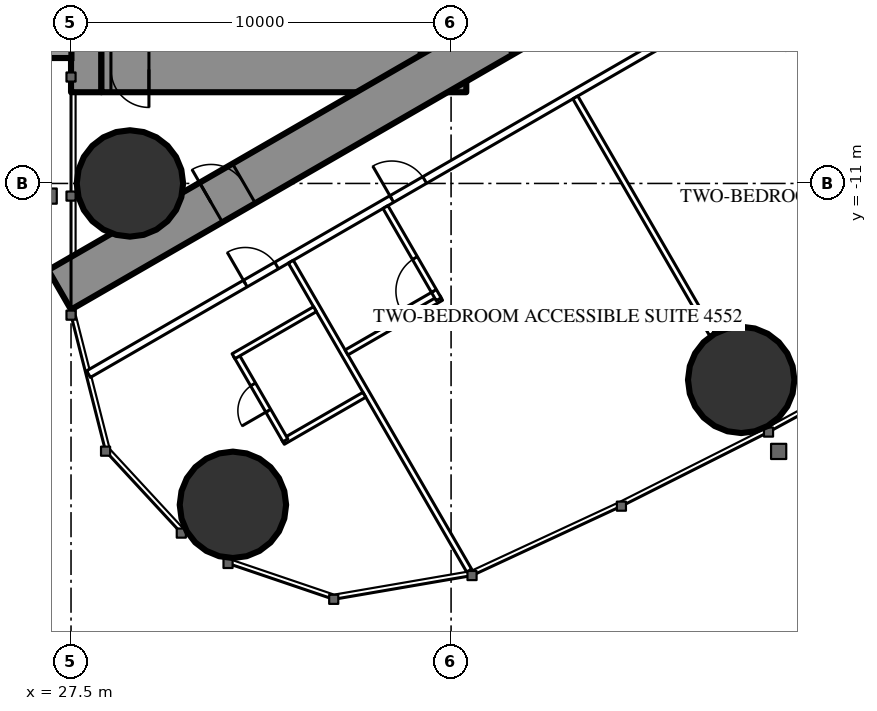
"""IFC4 building model, lengths in metres.
Left out: names, types, materials, properties, quantities, classifications, styles, units other than length and angle.
Written with IfcOpenShell. Run it as: python <this file> out.ifc"""

import sys

from ifc_helpers import new_model, si_unit, direction, frame, frame_2d, origin, origin_2d, place, context, subcontext, project, spatial, rectangle, circle, extrude, element, fill, save


model = new_model("IFC4")
c1 = context("Model", 3, precision=1e-05, world=origin(), true_north=direction((0.0, 1.0)))
c2 = subcontext(c1, "Body", "Model", "MODEL_VIEW")
j1 = project(units=[si_unit("LENGTHUNIT", "METRE"), si_unit("PLANEANGLEUNIT", "RADIAN")], contexts=[c1])
p1 = place(None, origin())
s1 = spatial("IfcSite", under=j1, at=p1, CompositionType="ELEMENT")
p2 = place(p1, origin())
s2 = spatial("IfcBuilding", under=s1, at=p2, CompositionType="ELEMENT")
p3 = place(p2, frame((0.0, 0.0, 170.3)))
s3 = spatial("IfcBuildingStorey", under=s2, at=p3, CompositionType="ELEMENT", Elevation=170.3)
for number, where, z_axis, x_axis in (
    (1, (31.76, -19.456, 0.0), (0.0, 0.0, 1.0), (1.0, 0.0, 0.0)),
    (2, (29.05, -11.0, 0.0), (0.0, 0.0, 1.0), (1.0, 0.0, 0.0)),
    (3, (45.134, -16.168, 0.0), (0.0, 0.0, 1.0), (1.0, 0.0, 0.0)),
):
    element("IfcColumn", number, at=place(p3, frame(where, z_axis=z_axis, x_axis=x_axis)), inside=s3, PredefinedType="COLUMN", context=c2, shape_type="SweptSolid", body=[
        extrude(circle(Radius=1.4, at=origin_2d()), origin(), (0.0, 0.0, 1.0), 3.5),
    ])
p4 = place(p3, frame((27.9, -8.6, 0.0), z_axis=(0.0, 0.0, 1.0), x_axis=(0.0, 1.0, 0.0)))
e4 = element("IfcWall", 4, at=p4, inside=s3, PredefinedType="SHEAR", context=c2, shape_type="SweptSolid", body=[
    extrude(rectangle(XDim=17.2, YDim=0.8, at=frame_2d((8.6, 0.0))), origin(), (0.0, 0.0, 1.0), 3.5),
])
p5 = place(p4, frame((2.45, 0.0, 0.6)))
e5 = element("IfcOpeningElement", 5, at=p5, cuts=e4, PredefinedType="OPENING", context=c2, shape_type="SweptSolid", body=[
    extrude(rectangle(XDim=0.6, YDim=2.1, at=frame_2d((0.3, 1.05))), frame((0.0, 0.41, 0.0), z_axis=(0.0, -1.0, 0.0), x_axis=(1.0, 0.0, 0.0)), (0.0, 0.0, 1.0), 0.82),
])
p6 = place(p4, frame((14.15, 0.0, 0.6)))
e6 = element("IfcOpeningElement", 6, at=p6, cuts=e4, PredefinedType="OPENING", context=c2, shape_type="SweptSolid", body=[
    extrude(rectangle(XDim=0.6, YDim=2.1, at=frame_2d((0.3, 1.05))), frame((0.0, 0.41, 0.0), z_axis=(0.0, -1.0, 0.0), x_axis=(1.0, 0.0, 0.0)), (0.0, 0.0, 1.0), 0.82),
])
p7 = place(p3, frame((37.3, -8.6, 0.0), z_axis=(0.0, 0.0, 1.0), x_axis=(0.0, 1.0, 0.0)))
e7 = element("IfcWall", 7, at=p7, inside=s3, PredefinedType="SHEAR", context=c2, shape_type="SweptSolid", body=[
    extrude(rectangle(XDim=17.2, YDim=1.2, at=frame_2d((8.6, 0.0))), origin(), (0.0, 0.0, 1.0), 3.5),
])
p8 = place(p7, frame((7.7, 0.0, 0.0)))
e8 = element("IfcOpeningElement", 8, at=p8, cuts=e7, PredefinedType="OPENING", context=c2, shape_type="SweptSolid", body=[
    extrude(rectangle(XDim=1.8, YDim=2.2, at=frame_2d((0.9, 1.1))), frame((0.0, 0.61, 0.0), z_axis=(0.0, -1.0, 0.0), x_axis=(1.0, 0.0, 0.0)), (0.0, 0.0, 1.0), 1.22),
])
p9 = place(p3, frame((28.3, -8.0, 0.0), z_axis=(0.0, 0.0, 1.0), x_axis=(1.0, 0.0, 0.0)))
e9 = element("IfcWall", 9, at=p9, inside=s3, PredefinedType="SHEAR", context=c2, shape_type="SweptSolid", body=[
    extrude(rectangle(XDim=8.4, YDim=1.2, at=frame_2d((4.2, 0.0))), origin(), (0.0, 0.0, 1.0), 3.5),
])
p10 = place(p9, frame((0.25, 0.0, 0.0)))
e10 = element("IfcOpeningElement", 10, at=p10, cuts=e9, PredefinedType="OPENING", context=c2, shape_type="SweptSolid", body=[
    extrude(rectangle(XDim=1.0, YDim=2.2, at=frame_2d((0.5, 1.1))), frame((0.0, 0.61, 0.0), z_axis=(0.0, -1.0, 0.0), x_axis=(1.0, 0.0, 0.0)), (0.0, 0.0, 1.0), 1.22),
])
p11 = place(p3, frame((27.2, -13.8, 0.0), z_axis=(0.0, 0.0, 1.0), x_axis=(0.866027159892, 0.499996958321, 0.0)))
e11 = element("IfcWall", 11, at=p11, inside=s3, PredefinedType="SHEAR", context=c2, shape_type="SweptSolid", body=[
    extrude(rectangle(XDim=27.947, YDim=1.2, at=frame_2d((13.973, 0.0))), origin(), (0.0, 0.0, 1.0), 3.5),
])
p12 = place(p11, frame((4.6, 0.0, 0.0)))
e12 = element("IfcOpeningElement", 12, at=p12, cuts=e11, PredefinedType="OPENING", context=c2, shape_type="SweptSolid", body=[
    extrude(rectangle(XDim=1.0, YDim=2.2, at=frame_2d((0.5, 1.1))), frame((0.0, 0.61, 0.0), z_axis=(0.0, -1.0, 0.0), x_axis=(1.0, 0.0, 0.0)), (0.0, 0.0, 1.0), 1.22),
])
p13 = place(p11, frame((13.395, 0.0, 0.0)))
e13 = element("IfcOpeningElement", 13, at=p13, cuts=e11, PredefinedType="OPENING", context=c2, shape_type="SweptSolid", body=[
    extrude(rectangle(XDim=1.8, YDim=2.2, at=frame_2d((0.9, 1.1))), frame((0.0, 0.61, 0.0), z_axis=(0.0, -1.0, 0.0), x_axis=(1.0, 0.0, 0.0)), (0.0, 0.0, 1.0), 1.22),
])
p14 = place(p3, frame((27.959, -16.017, 0.0), z_axis=(0.0, 0.0, 1.0), x_axis=(0.866024151371, 0.500002169237, 0.0)))
e14 = element("IfcWall", 14, at=p14, inside=s3, PredefinedType="PARTITIONING", context=c2, shape_type="SweptSolid", body=[
    extrude(rectangle(XDim=32.034, YDim=0.2, at=frame_2d((16.017, 0.0))), origin(), (0.0, 0.0, 1.0), 3.25),
])
p15 = place(p14, frame((4.765, 0.0, 0.0)))
e15 = element("IfcOpeningElement", 15, at=p15, cuts=e14, PredefinedType="OPENING", context=c2, shape_type="SweptSolid", body=[
    extrude(rectangle(XDim=0.95, YDim=2.2, at=frame_2d((0.475, 1.1))), frame((0.0, 0.11, 0.0), z_axis=(0.0, -1.0, 0.0), x_axis=(1.0, 0.0, 0.0)), (0.0, 0.0, 1.0), 0.22),
])
p16 = place(p14, frame((9.215, 0.0, 0.0)))
e16 = element("IfcOpeningElement", 16, at=p16, cuts=e14, PredefinedType="OPENING", context=c2, shape_type="SweptSolid", body=[
    extrude(rectangle(XDim=1.0, YDim=2.2, at=frame_2d((0.5, 1.1))), frame((0.0, 0.11, 0.0), z_axis=(0.0, -1.0, 0.0), x_axis=(1.0, 0.0, 0.0)), (0.0, 0.0, 1.0), 0.22),
])
p17 = place(p14, frame((19.725, 0.0, 0.0)))
e17 = element("IfcOpeningElement", 17, at=p17, cuts=e14, PredefinedType="OPENING", context=c2, shape_type="SweptSolid", body=[
    extrude(rectangle(XDim=0.95, YDim=2.2, at=frame_2d((0.475, 1.1))), frame((0.0, 0.11, 0.0), z_axis=(0.0, -1.0, 0.0), x_axis=(1.0, 0.0, 0.0)), (0.0, 0.0, 1.0), 0.22),
])
p18 = place(p14, frame((26.125, 0.0, 0.0)))
e18 = element("IfcOpeningElement", 18, at=p18, cuts=e14, PredefinedType="OPENING", context=c2, shape_type="SweptSolid", body=[
    extrude(rectangle(XDim=0.95, YDim=2.2, at=frame_2d((0.475, 1.1))), frame((0.0, 0.11, 0.0), z_axis=(0.0, -1.0, 0.0), x_axis=(1.0, 0.0, 0.0)), (0.0, 0.0, 1.0), 0.22),
])
p19 = place(p14, frame((28.106, 0.0, 0.0)))
e19 = element("IfcOpeningElement", 19, at=p19, cuts=e14, PredefinedType="OPENING", context=c2, shape_type="SweptSolid", body=[
    extrude(rectangle(XDim=0.95, YDim=2.2, at=frame_2d((0.475, 1.1))), frame((0.0, 0.11, 0.0), z_axis=(0.0, -1.0, 0.0), x_axis=(1.0, 0.0, 0.0)), (0.0, 0.0, 1.0), 0.22),
])
p20 = place(p3, frame((33.284, -13.059, 0.0), z_axis=(0.0, 0.0, 1.0), x_axis=(0.499985904184, -0.866033541855, 0.0)))
e20 = element("IfcWall", 20, at=p20, inside=s3, PredefinedType="PARTITIONING", context=c2, shape_type="SweptSolid", body=[
    extrude(rectangle(XDim=9.385, YDim=0.15, at=frame_2d((4.693, 0.0))), origin(), (0.0, 0.0, 1.0), 3.25),
])
p21 = place(p3, frame((40.769, -8.737, 0.0), z_axis=(0.0, 0.0, 1.0), x_axis=(0.500013115284, -0.866017831539, 0.0)))
e21 = element("IfcWall", 21, at=p21, inside=s3, PredefinedType="PARTITIONING", context=c2, shape_type="SweptSolid", body=[
    extrude(rectangle(XDim=7.198, YDim=0.15, at=frame_2d((3.599, 0.0))), origin(), (0.0, 0.0, 1.0), 2.3),
])
p22 = place(p3, frame((33.075, -17.798, 0.0), z_axis=(0.0, 0.0, 1.0), x_axis=(0.866006523861, 0.500032699561, 0.0)))
e22 = element("IfcWall", 22, at=p22, inside=s3, PredefinedType="PARTITIONING", context=c2, shape_type="SweptSolid", body=[
    extrude(rectangle(XDim=2.475, YDim=0.15, at=frame_2d((1.237, 0.0))), origin(), (0.0, 0.0, 1.0), 3.25),
])
p23 = place(p3, frame((31.84, -15.509, 0.0), z_axis=(0.0, 0.0, 1.0), x_axis=(0.500006934395, -0.866021400173, 0.0)))
e23 = element("IfcWall", 23, at=p23, inside=s3, PredefinedType="PARTITIONING", context=c2, shape_type="SweptSolid", body=[
    extrude(rectangle(XDim=2.6, YDim=0.15, at=frame_2d((1.3, 0.0))), origin(), (0.0, 0.0, 1.0), 3.25),
])
p24 = place(p23, frame((0.9, 0.0, 0.0)))
e24 = element("IfcOpeningElement", 24, at=p24, cuts=e23, PredefinedType="OPENING", context=c2, shape_type="SweptSolid", body=[
    extrude(rectangle(XDim=0.8, YDim=2.2, at=frame_2d((0.4, 1.1))), frame((0.0, 0.085, 0.0), z_axis=(0.0, -1.0, 0.0), x_axis=(1.0, 0.0, 0.0)), (0.0, 0.0, 1.0), 0.17),
])
p25 = place(p3, frame((31.775, -15.546, 0.0), z_axis=(0.0, 0.0, 1.0), x_axis=(0.866031185235, 0.4999899861, 0.0)))
e25 = element("IfcWall", 25, at=p25, inside=s3, PredefinedType="PARTITIONING", context=c2, shape_type="SweptSolid", body=[
    extrude(rectangle(XDim=2.475, YDim=0.15, at=frame_2d((1.238, 0.0))), origin(), (0.0, 0.0, 1.0), 3.25),
])
p26 = place(p3, frame((34.749, -15.446, 0.0), z_axis=(0.0, 0.0, 1.0), x_axis=(0.866018712932, 0.500011588718, 0.0)))
e26 = element("IfcWall", 26, at=p26, inside=s3, PredefinedType="PARTITIONING", context=c2, shape_type="SweptSolid", body=[
    extrude(rectangle(XDim=2.875, YDim=0.15, at=frame_2d((1.438, 0.0))), origin(), (0.0, 0.0, 1.0), 3.25),
])
p27 = place(p3, frame((35.773, -11.621, 0.0), z_axis=(0.0, 0.0, 1.0), x_axis=(0.49998411664, -0.866034573852, 0.0)))
e27 = element("IfcWall", 27, at=p27, inside=s3, PredefinedType="PARTITIONING", context=c2, shape_type="SweptSolid", body=[
    extrude(rectangle(XDim=2.8, YDim=0.15, at=frame_2d((1.4, 0.0))), origin(), (0.0, 0.0, 1.0), 3.25),
])
p28 = place(p27, frame((1.55, 0.0, 0.0)))
e28 = element("IfcOpeningElement", 28, at=p28, cuts=e27, PredefinedType="OPENING", context=c2, shape_type="SweptSolid", body=[
    extrude(rectangle(XDim=1.0, YDim=2.2, at=frame_2d((0.5, 1.1))), frame((0.0, 0.085, 0.0), z_axis=(0.0, -1.0, 0.0), x_axis=(1.0, 0.0, 0.0)), (0.0, 0.0, 1.0), 0.17),
])
p29 = place(p3, frame((46.131, -5.641, 0.0), z_axis=(0.0, 0.0, 1.0), x_axis=(0.49997716683, -0.86603858612, 0.0)))
e29 = element("IfcWall", 29, at=p29, inside=s3, PredefinedType="PARTITIONING", context=c2, shape_type="SweptSolid", body=[
    extrude(rectangle(XDim=2.6, YDim=0.15, at=frame_2d((1.3, 0.0))), origin(), (0.0, 0.0, 1.0), 3.25),
])
p30 = place(p29, frame((0.9, 0.0, 0.0)))
e30 = element("IfcOpeningElement", 30, at=p30, cuts=e29, PredefinedType="OPENING", context=c2, shape_type="SweptSolid", body=[
    extrude(rectangle(XDim=0.8, YDim=2.2, at=frame_2d((0.4, 1.1))), frame((0.0, 0.085, 0.0), z_axis=(0.0, -1.0, 0.0), x_axis=(1.0, 0.0, 0.0)), (0.0, 0.0, 1.0), 0.17),
])
p31 = place(p24, origin())
e31 = element("IfcDoor", 31, at=p31, inside=s3, OperationType="SINGLE_SWING_RIGHT", PredefinedType="DOOR", context=c2, shape_type="SweptSolid", body=[
    extrude(rectangle(XDim=0.8, YDim=2.2, at=frame_2d((0.4, 1.1))), frame((0.0, 0.025, 0.0), z_axis=(0.0, -1.0, 0.0), x_axis=(1.0, 0.0, 0.0)), (0.0, 0.0, 1.0), 0.05),
])
fill(e24, e31)
p32 = place(p15, origin())
e32 = element("IfcDoor", 32, at=p32, inside=s3, OperationType="SINGLE_SWING_LEFT", PredefinedType="DOOR", context=c2, shape_type="SweptSolid", body=[
    extrude(rectangle(XDim=0.95, YDim=2.2, at=frame_2d((0.475, 1.1))), frame((0.0, 0.025, 0.0), z_axis=(0.0, -1.0, 0.0), x_axis=(1.0, 0.0, 0.0)), (0.0, 0.0, 1.0), 0.05),
])
fill(e15, e32)
p33 = place(p28, origin())
e33 = element("IfcDoor", 33, at=p33, inside=s3, OperationType="SINGLE_SWING_RIGHT", PredefinedType="DOOR", context=c2, shape_type="SweptSolid", body=[
    extrude(rectangle(XDim=1.0, YDim=2.2, at=frame_2d((0.5, 1.1))), frame((0.0, 0.025, 0.0), z_axis=(0.0, -1.0, 0.0), x_axis=(1.0, 0.0, 0.0)), (0.0, 0.0, 1.0), 0.05),
])
fill(e28, e33)
p34 = place(p16, origin())
e34 = element("IfcDoor", 34, at=p34, inside=s3, OperationType="SINGLE_SWING_LEFT", PredefinedType="DOOR", context=c2, shape_type="SweptSolid", body=[
    extrude(rectangle(XDim=1.0, YDim=2.2, at=frame_2d((0.5, 1.1))), frame((0.0, 0.025, 0.0), z_axis=(0.0, -1.0, 0.0), x_axis=(1.0, 0.0, 0.0)), (0.0, 0.0, 1.0), 0.05),
])
fill(e16, e34)
p35 = place(p12, origin())
e35 = element("IfcDoor", 35, at=p35, inside=s3, OperationType="SINGLE_SWING_LEFT", PredefinedType="DOOR", context=c2, shape_type="SweptSolid", body=[
    extrude(rectangle(XDim=1.0, YDim=2.2, at=frame_2d((0.5, 1.1))), frame((0.0, 0.025, 0.0), z_axis=(0.0, -1.0, 0.0), x_axis=(1.0, 0.0, 0.0)), (0.0, 0.0, 1.0), 0.05),
])
fill(e12, e35)
p36 = place(p10, origin())
e36 = element("IfcDoor", 36, at=p36, inside=s3, OperationType="SINGLE_SWING_RIGHT", PredefinedType="DOOR", context=c2, shape_type="SweptSolid", body=[
    extrude(rectangle(XDim=1.0, YDim=2.2, at=frame_2d((0.5, 1.1))), frame((0.0, 0.025, 0.0), z_axis=(0.0, -1.0, 0.0), x_axis=(1.0, 0.0, 0.0)), (0.0, 0.0, 1.0), 0.05),
])
fill(e10, e36)
save(model, sys.argv[1])
